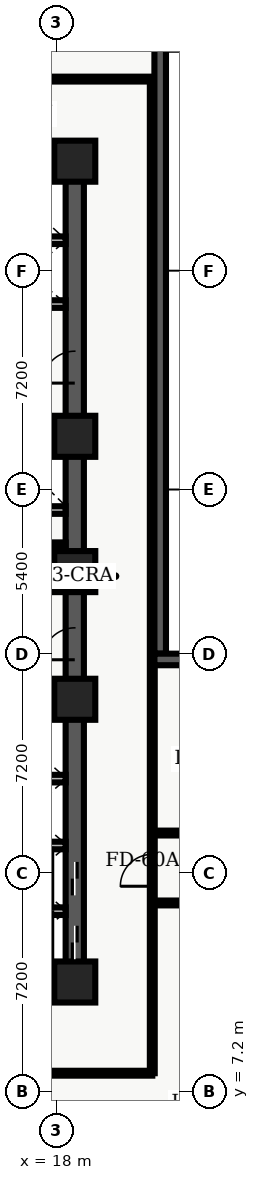
"""IFC4 building model, lengths in metres.
Left out: names, types, materials, properties, quantities, classifications, styles, units other than length and angle.
Written with IfcOpenShell. Run it as: python <this file> out.ifc"""

import sys

from ifc_helpers import new_model, entity, si_unit, converted_unit, direction, frame, origin_with_axes, origin_2d_with_axis, place, context, subcontext, project, spatial, polyline, rectangle, outline, extrude, element, fill, save


model = new_model("IFC4")
c1 = context("Model", 3, precision=1e-05, world=origin_with_axes(), true_north=direction((0.0, 1.0)))
c2 = subcontext(c1, "Body", "Model", "MODEL_VIEW")
j1 = project(units=[si_unit("LENGTHUNIT", "METRE"), converted_unit("PLANEANGLEUNIT", "DEGREE", entity("IfcPlaneAngleMeasure", 0.017), si_unit("PLANEANGLEUNIT", "RADIAN"), dimensions=[0, 0, 0, 0, 0, 0, 0])], contexts=[c1])
p1 = place(None, origin_with_axes())
s1 = spatial("IfcSite", under=j1, at=p1, CompositionType="ELEMENT")
p2 = place(p1, origin_with_axes())
s2 = spatial("IfcBuilding", under=s1, at=p2, CompositionType="ELEMENT")
p3 = place(p2, frame((0.0, 0.0, 56.1), z_axis=(0.0, 0.0, 1.0), x_axis=(1.0, 0.0, 0.0)))
s3 = spatial("IfcBuildingStorey", under=s2, at=p3, CompositionType="ELEMENT", Elevation=56.1)
p4 = place(p3, frame((11.4, 10.8, 0.0), z_axis=(0.0, 0.0, 1.0), x_axis=(1.0, 0.0, 0.0)))
e1 = element("IfcWall", 1, at=p4, inside=s3, PredefinedType="SHEAR", context=c2, shape_type="SweptSolid", body=[
    extrude(outline(polyline([(0.0, -0.3), (7.2, -0.3), (7.2, 0.3), (0.0, 0.3), (0.0, -0.3)])), origin_with_axes(), (0.0, 0.0, 1.0), 3.66),
])
p5 = place(p4, frame((2.625, 0.0, 0.0), z_axis=(0.0, 0.0, 1.0), x_axis=(1.0, 0.0, 0.0)))
e2 = element("IfcOpeningElement", 2, at=p5, cuts=e1, PredefinedType="OPENING", context=c2, shape_type="SweptSolid", body=[
    extrude(rectangle(XDim=1.05, YDim=0.62, at=origin_2d_with_axis()), origin_with_axes(), (0.0, 0.0, 1.0), 2.15),
])
p6 = place(p3, frame((11.4, 37.8, 0.0), z_axis=(0.0, 0.0, 1.0), x_axis=(1.0, 0.0, 0.0)))
e3 = element("IfcWall", 3, at=p6, inside=s3, PredefinedType="SHEAR", context=c2, shape_type="SweptSolid", body=[
    extrude(outline(polyline([(0.0, -0.3), (7.2, -0.3), (7.2, 0.3), (0.0, 0.3), (0.0, -0.3)])), origin_with_axes(), (0.0, 0.0, 1.0), 3.66),
])
p7 = place(p6, frame((2.625, 0.0, 0.0), z_axis=(0.0, 0.0, 1.0), x_axis=(1.0, 0.0, 0.0)))
e4 = element("IfcOpeningElement", 4, at=p7, cuts=e3, PredefinedType="OPENING", context=c2, shape_type="SweptSolid", body=[
    extrude(rectangle(XDim=1.05, YDim=0.62, at=origin_2d_with_axis()), origin_with_axes(), (0.0, 0.0, 1.0), 2.15),
])
p8 = place(p3, frame((18.6, 10.8, 0.0), z_axis=(0.0, 0.0, 1.0), x_axis=(0.0, 1.0, 0.0)))
e5 = element("IfcWall", 5, at=p8, inside=s3, PredefinedType="SHEAR", context=c2, shape_type="SweptSolid", body=[
    extrude(outline(polyline([(0.0, -0.3), (13.5, -0.3), (13.5, 0.3), (0.0, 0.3), (0.0, -0.3)])), origin_with_axes(), (0.0, 0.0, 1.0), 3.66),
])
p9 = place(p8, frame((1.3, 0.0, 0.0), z_axis=(0.0, 0.0, 1.0), x_axis=(1.0, 0.0, 0.0)))
e6 = element("IfcOpeningElement", 6, at=p9, cuts=e5, PredefinedType="OPENING", context=c2, shape_type="SweptSolid", body=[
    extrude(rectangle(XDim=1.1, YDim=0.62, at=origin_2d_with_axis()), origin_with_axes(), (0.0, 0.0, 1.0), 2.15),
])
p10 = place(p8, frame((3.4, 0.0, 0.0), z_axis=(0.0, 0.0, 1.0), x_axis=(1.0, 0.0, 0.0)))
e7 = element("IfcOpeningElement", 7, at=p10, cuts=e5, PredefinedType="OPENING", context=c2, shape_type="SweptSolid", body=[
    extrude(rectangle(XDim=1.1, YDim=0.62, at=origin_2d_with_axis()), origin_with_axes(), (0.0, 0.0, 1.0), 2.15),
])
p11 = place(p8, frame((11.125, 0.0, 0.0), z_axis=(0.0, 0.0, 1.0), x_axis=(1.0, 0.0, 0.0)))
e8 = element("IfcOpeningElement", 8, at=p11, cuts=e5, PredefinedType="OPENING", context=c2, shape_type="SweptSolid", body=[
    extrude(rectangle(XDim=1.05, YDim=0.62, at=origin_2d_with_axis()), origin_with_axes(), (0.0, 0.0, 1.0), 2.15),
])
p12 = place(p3, frame((18.6, 24.3, 0.0), z_axis=(0.0, 0.0, 1.0), x_axis=(0.0, 1.0, 0.0)))
e9 = element("IfcWall", 9, at=p12, inside=s3, PredefinedType="SHEAR", context=c2, shape_type="SweptSolid", body=[
    extrude(outline(polyline([(0.0, -0.3), (13.5, -0.3), (13.5, 0.3), (0.0, 0.3), (0.0, -0.3)])), origin_with_axes(), (0.0, 0.0, 1.0), 3.66),
])
p13 = place(p12, frame((6.725, 0.0, 0.0), z_axis=(0.0, 0.0, 1.0), x_axis=(1.0, 0.0, 0.0)))
e10 = element("IfcOpeningElement", 10, at=p13, cuts=e9, PredefinedType="OPENING", context=c2, shape_type="SweptSolid", body=[
    extrude(rectangle(XDim=1.05, YDim=0.62, at=origin_2d_with_axis()), origin_with_axes(), (0.0, 0.0, 1.0), 2.15),
])
for number, where, z_axis, x_axis in (
    (11, (11.7, 19.825, 0.0), (0.0, 0.0, 1.0), (1.0, 0.0, 0.0)),
    (12, (11.7, 28.775, 0.0), (0.0, 0.0, 1.0), (1.0, 0.0, 0.0)),
):
    element("IfcWall", number, at=place(p3, frame(where, z_axis=z_axis, x_axis=x_axis)), inside=s3, PredefinedType="SHEAR", context=c2, shape_type="SweptSolid", body=[
        extrude(outline(polyline([(0.0, -0.125), (6.6, -0.125), (6.6, 0.125), (0.0, 0.125), (0.0, -0.125)])), origin_with_axes(), (0.0, 0.0, 1.0), 3.66),
    ])
p14 = place(p3, frame((11.7, 24.1, 0.0), z_axis=(0.0, 0.0, 1.0), x_axis=(1.0, 0.0, 0.0)))
e13 = element("IfcWall", 13, at=p14, inside=s3, PredefinedType="SOLIDWALL", context=c2, shape_type="SweptSolid", body=[
    extrude(outline(polyline([(0.0, -0.125), (6.6, -0.125), (6.6, 0.125), (0.0, 0.125), (0.0, -0.125)])), origin_with_axes(), (0.0, 0.0, 1.0), 2.7),
])
p15 = place(p14, frame((3.75, 0.0, 0.0), z_axis=(0.0, 0.0, 1.0), x_axis=(1.0, 0.0, 0.0)))
e14 = element("IfcOpeningElement", 14, at=p15, cuts=e13, PredefinedType="OPENING", context=c2, shape_type="SweptSolid", body=[
    extrude(rectangle(XDim=0.9, YDim=0.27, at=origin_2d_with_axis()), origin_with_axes(), (0.0, 0.0, 1.0), 2.15),
])
p16 = place(p3, frame((11.7, 26.325, 0.0), z_axis=(0.0, 0.0, 1.0), x_axis=(1.0, 0.0, 0.0)))
e15 = element("IfcWall", 15, at=p16, inside=s3, PredefinedType="SOLIDWALL", context=c2, shape_type="SweptSolid", body=[
    extrude(outline(polyline([(0.0, -0.125), (6.6, -0.125), (6.6, 0.125), (0.0, 0.125), (0.0, -0.125)])), origin_with_axes(), (0.0, 0.0, 1.0), 2.7),
])
p17 = place(p16, frame((3.5, 0.0, 0.0), z_axis=(0.0, 0.0, 1.0), x_axis=(1.0, 0.0, 0.0)))
e16 = element("IfcOpeningElement", 16, at=p17, cuts=e15, PredefinedType="OPENING", context=c2, shape_type="SweptSolid", body=[
    extrude(rectangle(XDim=0.9, YDim=0.27, at=origin_2d_with_axis()), origin_with_axes(), (0.0, 0.0, 1.0), 2.15),
])
for number, where, z_axis, x_axis in (
    (17, (18.6, 10.8, 0.0), (0.0, 0.0, 1.0), (1.0, 0.0, 0.0)),
    (18, (18.6, 20.1, 0.0), (0.0, 0.0, 1.0), (1.0, 0.0, 0.0)),
    (19, (18.6, 24.3, 0.0), (0.0, 0.0, 1.0), (1.0, 0.0, 0.0)),
    (20, (18.6, 28.75, 0.0), (0.0, 0.0, 1.0), (1.0, 0.0, 0.0)),
    (21, (18.6, 37.8, 0.0), (0.0, 0.0, 1.0), (1.0, 0.0, 0.0)),
):
    element("IfcColumn", number, at=place(p3, frame(where, z_axis=z_axis, x_axis=x_axis)), inside=s3, PredefinedType="COLUMN", context=c2, shape_type="SweptSolid", body=[
        extrude(rectangle(XDim=1.35, YDim=1.35, at=origin_2d_with_axis()), origin_with_axes(), (0.0, 0.0, 1.0), 3.9),
    ])
p18 = place(p3, frame((14.62, 25.18, 0.0), z_axis=(0.0, 0.0, 1.0), x_axis=(1.0, 0.0, 0.0)))
e22 = element("IfcWall", 22, at=p18, inside=s3, PredefinedType="PARTITIONING", context=c2, shape_type="SweptSolid", body=[
    extrude(outline(polyline([(0.0, -0.08), (3.68, -0.08), (3.68, 0.08), (0.0, 0.08), (0.0, -0.08)])), origin_with_axes(), (0.0, 0.0, 1.0), 2.7),
])
p19 = place(p18, frame((1.95, 0.0, 0.0), z_axis=(0.0, 0.0, 1.0), x_axis=(1.0, 0.0, 0.0)))
e23 = element("IfcOpeningElement", 23, at=p19, cuts=e22, PredefinedType="OPENING", context=c2, shape_type="SweptSolid", body=[
    extrude(rectangle(XDim=0.9, YDim=0.18, at=origin_2d_with_axis()), origin_with_axes(), (0.0, 0.0, 1.0), 2.15),
])
for number, where, z_axis, x_axis in (
    (24, (15.84, 13.13, 0.0), (0.0, 0.0, 1.0), (1.0, 0.0, 0.0)),
    (25, (15.84, 15.29, 0.0), (0.0, 0.0, 1.0), (1.0, 0.0, 0.0)),
    (26, (15.84, 17.49, 0.0), (0.0, 0.0, 1.0), (1.0, 0.0, 0.0)),
    (27, (15.84, 33.1, 0.0), (0.0, 0.0, 1.0), (1.0, 0.0, 0.0)),
    (28, (15.84, 35.2, 0.0), (0.0, 0.0, 1.0), (1.0, 0.0, 0.0)),
):
    element("IfcWall", number, at=place(p3, frame(where, z_axis=z_axis, x_axis=x_axis)), inside=s3, PredefinedType="SOLIDWALL", context=c2, shape_type="SweptSolid", body=[
        extrude(outline(polyline([(0.0, -0.125), (2.46, -0.125), (2.46, 0.125), (0.0, 0.125), (0.0, -0.125)])), origin_with_axes(), (0.0, 0.0, 1.0), 2.7),
    ])
p20 = place(p3, frame((2.6, 7.8, 0.0), z_axis=(0.0, 0.0, 1.0), x_axis=(1.0, 0.0, 0.0)))
e29 = element("IfcWall", 29, at=p20, inside=s3, PredefinedType="PARTITIONING", context=c2, shape_type="SweptSolid", body=[
    extrude(outline(polyline([(0.0, -0.08), (18.55, -0.08), (18.55, 0.08), (0.0, 0.08), (0.0, -0.08)])), origin_with_axes(), (0.0, 0.0, 1.0), 2.7),
])
p21 = place(p20, frame((2.91, 0.0, 0.0), z_axis=(0.0, 0.0, 1.0), x_axis=(1.0, 0.0, 0.0)))
e30 = element("IfcOpeningElement", 30, at=p21, cuts=e29, PredefinedType="OPENING", context=c2, shape_type="SweptSolid", body=[
    extrude(rectangle(XDim=1.2, YDim=0.18, at=origin_2d_with_axis()), origin_with_axes(), (0.0, 0.0, 1.0), 2.2),
])
p22 = place(p20, frame((13.415, 0.0, 0.0), z_axis=(0.0, 0.0, 1.0), x_axis=(1.0, 0.0, 0.0)))
e31 = element("IfcOpeningElement", 31, at=p22, cuts=e29, PredefinedType="OPENING", context=c2, shape_type="SweptSolid", body=[
    extrude(rectangle(XDim=1.0, YDim=0.18, at=origin_2d_with_axis()), origin_with_axes(), (0.0, 0.0, 1.0), 2.15),
])
p23 = place(p3, frame((2.6, 40.5, 0.0), z_axis=(0.0, 0.0, 1.0), x_axis=(1.0, 0.0, 0.0)))
e32 = element("IfcWall", 32, at=p23, inside=s3, PredefinedType="PARTITIONING", context=c2, shape_type="SweptSolid", body=[
    extrude(outline(polyline([(0.0, -0.08), (18.65, -0.08), (18.65, 0.08), (0.0, 0.08), (0.0, -0.08)])), origin_with_axes(), (0.0, 0.0, 1.0), 2.7),
])
p24 = place(p23, frame((2.915, 0.0, 0.0), z_axis=(0.0, 0.0, 1.0), x_axis=(1.0, 0.0, 0.0)))
e33 = element("IfcOpeningElement", 33, at=p24, cuts=e32, PredefinedType="OPENING", context=c2, shape_type="SweptSolid", body=[
    extrude(rectangle(XDim=1.0, YDim=0.18, at=origin_2d_with_axis()), origin_with_axes(), (0.0, 0.0, 1.0), 2.15),
])
p25 = place(p23, frame((9.254, 0.0, 0.0), z_axis=(0.0, 0.0, 1.0), x_axis=(1.0, 0.0, 0.0)))
e34 = element("IfcOpeningElement", 34, at=p25, cuts=e32, PredefinedType="OPENING", context=c2, shape_type="SweptSolid", body=[
    extrude(rectangle(XDim=1.2, YDim=0.18, at=origin_2d_with_axis()), origin_with_axes(), (0.0, 0.0, 1.0), 2.2),
])
p26 = place(p23, frame((14.543, 0.0, 0.0), z_axis=(0.0, 0.0, 1.0), x_axis=(1.0, 0.0, 0.0)))
e35 = element("IfcOpeningElement", 35, at=p26, cuts=e32, PredefinedType="OPENING", context=c2, shape_type="SweptSolid", body=[
    extrude(rectangle(XDim=1.0, YDim=0.18, at=origin_2d_with_axis()), origin_with_axes(), (0.0, 0.0, 1.0), 2.15),
])
p27 = place(p3, frame((21.15, 7.8, 0.0), z_axis=(0.0, 0.0, 1.0), x_axis=(0.0, 1.0, 0.0)))
e36 = element("IfcWall", 36, at=p27, inside=s3, PredefinedType="PARTITIONING", context=c2, shape_type="SweptSolid", body=[
    extrude(outline(polyline([(0.0, -0.08), (32.7, -0.08), (32.7, 0.08), (0.0, 0.08), (0.0, -0.08)])), origin_with_axes(), (0.0, 0.0, 1.0), 2.7),
])
p28 = place(p27, frame((6.675, 0.0, 0.0), z_axis=(0.0, 0.0, 1.0), x_axis=(1.0, 0.0, 0.0)))
e37 = element("IfcOpeningElement", 37, at=p28, cuts=e36, PredefinedType="OPENING", context=c2, shape_type="SweptSolid", body=[
    extrude(rectangle(XDim=1.05, YDim=0.18, at=origin_2d_with_axis()), origin_with_axes(), (0.0, 0.0, 1.0), 2.15),
])
p29 = place(p3, frame((21.15, 13.4, 0.0), z_axis=(0.0, 0.0, 1.0), x_axis=(1.0, 0.0, 0.0)))
e38 = element("IfcWall", 38, at=p29, inside=s3, PredefinedType="PARTITIONING", context=c2, shape_type="SweptSolid", body=[
    extrude(outline(polyline([(0.0, -0.08), (15.2, -0.08), (15.2, 0.08), (0.0, 0.08), (0.0, -0.08)])), origin_with_axes(), (0.0, 0.0, 1.0), 2.7),
])
p30 = place(p29, frame((2.284, 0.0, 0.0), z_axis=(0.0, 0.0, 1.0), x_axis=(1.0, 0.0, 0.0)))
e39 = element("IfcOpeningElement", 39, at=p30, cuts=e38, PredefinedType="OPENING", context=c2, shape_type="SweptSolid", body=[
    extrude(rectangle(XDim=1.0, YDim=0.18, at=origin_2d_with_axis()), origin_with_axes(), (0.0, 0.0, 1.0), 2.15),
])
p31 = place(p29, frame((6.853, 0.0, 0.0), z_axis=(0.0, 0.0, 1.0), x_axis=(1.0, 0.0, 0.0)))
e40 = element("IfcOpeningElement", 40, at=p31, cuts=e38, PredefinedType="OPENING", context=c2, shape_type="SweptSolid", body=[
    extrude(rectangle(XDim=1.2, YDim=0.18, at=origin_2d_with_axis()), origin_with_axes(), (0.0, 0.0, 1.0), 2.2),
])
p32 = place(p29, frame((12.219, 0.0, 0.0), z_axis=(0.0, 0.0, 1.0), x_axis=(1.0, 0.0, 0.0)))
e41 = element("IfcOpeningElement", 41, at=p32, cuts=e38, PredefinedType="OPENING", context=c2, shape_type="SweptSolid", body=[
    extrude(rectangle(XDim=1.0, YDim=0.18, at=origin_2d_with_axis()), origin_with_axes(), (0.0, 0.0, 1.0), 2.15),
])
p33 = place(p3, frame((21.15, 15.7, 0.0), z_axis=(0.0, 0.0, 1.0), x_axis=(1.0, 0.0, 0.0)))
e42 = element("IfcWall", 42, at=p33, inside=s3, PredefinedType="PARTITIONING", context=c2, shape_type="SweptSolid", body=[
    extrude(outline(polyline([(0.0, -0.08), (15.2, -0.08), (15.2, 0.08), (0.0, 0.08), (0.0, -0.08)])), origin_with_axes(), (0.0, 0.0, 1.0), 2.7),
])
p34 = place(p33, frame((3.583, 0.0, 0.0), z_axis=(0.0, 0.0, 1.0), x_axis=(1.0, 0.0, 0.0)))
e43 = element("IfcOpeningElement", 43, at=p34, cuts=e42, PredefinedType="OPENING", context=c2, shape_type="SweptSolid", body=[
    extrude(rectangle(XDim=1.0, YDim=0.18, at=origin_2d_with_axis()), origin_with_axes(), (0.0, 0.0, 1.0), 2.15),
])
p35 = place(p33, frame((11.053, 0.0, 0.0), z_axis=(0.0, 0.0, 1.0), x_axis=(1.0, 0.0, 0.0)))
e44 = element("IfcOpeningElement", 44, at=p35, cuts=e42, PredefinedType="OPENING", context=c2, shape_type="SweptSolid", body=[
    extrude(rectangle(XDim=1.0, YDim=0.18, at=origin_2d_with_axis()), origin_with_axes(), (0.0, 0.0, 1.0), 2.15),
])
p36 = place(p3, frame((21.41, 45.82, 0.0), z_axis=(0.0, 0.0, 1.0), x_axis=(0.0, -1.0, 0.0)))
e45 = element("IfcWall", 45, at=p36, inside=s3, PredefinedType="SOLIDWALL", context=c2, shape_type="SweptSolid", body=[
    extrude(outline(polyline([(0.0, -0.19), (24.22, -0.19), (24.22, 0.19), (0.0, 0.19), (0.0, -0.19)])), origin_with_axes(), (0.0, 0.0, 1.0), 3.66),
])
p37 = place(p36, frame((2.902, 0.0, 0.45), z_axis=(0.0, 0.0, 1.0), x_axis=(1.0, 0.0, 0.0)))
e46 = element("IfcOpeningElement", 46, at=p37, cuts=e45, PredefinedType="OPENING", context=c2, shape_type="SweptSolid", body=[
    extrude(rectangle(XDim=2.1, YDim=0.4, at=origin_2d_with_axis()), origin_with_axes(), (0.0, 0.0, 1.0), 2.2),
])
p38 = place(p3, frame((21.22, 21.41, 0.0), z_axis=(0.0, 0.0, 1.0), x_axis=(1.0, 0.0, 0.0)))
e47 = element("IfcWall", 47, at=p38, inside=s3, PredefinedType="SOLIDWALL", context=c2, shape_type="SweptSolid", body=[
    extrude(outline(polyline([(0.0, -0.19), (17.18, -0.19), (17.18, 0.19), (0.0, 0.19), (0.0, -0.19)])), origin_with_axes(), (0.0, 0.0, 1.0), 3.66),
])
p39 = place(p38, frame((3.263, 0.0, 0.45), z_axis=(0.0, 0.0, 1.0), x_axis=(1.0, 0.0, 0.0)))
e48 = element("IfcOpeningElement", 48, at=p39, cuts=e47, PredefinedType="OPENING", context=c2, shape_type="SweptSolid", body=[
    extrude(rectangle(XDim=2.1, YDim=0.4, at=origin_2d_with_axis()), origin_with_axes(), (0.0, 0.0, 1.0), 2.2),
])
p40 = place(p38, frame((8.59, 0.0, 0.45), z_axis=(0.0, 0.0, 1.0), x_axis=(1.0, 0.0, 0.0)))
e49 = element("IfcOpeningElement", 49, at=p40, cuts=e47, PredefinedType="OPENING", context=c2, shape_type="SweptSolid", body=[
    extrude(rectangle(XDim=2.1, YDim=0.4, at=origin_2d_with_axis()), origin_with_axes(), (0.0, 0.0, 1.0), 2.2),
])
p41 = place(p38, frame((13.467, 0.0, 0.45), z_axis=(0.0, 0.0, 1.0), x_axis=(1.0, 0.0, 0.0)))
e50 = element("IfcOpeningElement", 50, at=p41, cuts=e47, PredefinedType="OPENING", context=c2, shape_type="SweptSolid", body=[
    extrude(rectangle(XDim=2.1, YDim=0.4, at=origin_2d_with_axis()), origin_with_axes(), (0.0, 0.0, 1.0), 2.2),
])
p42 = place(p8, frame((1.3, 0.0, 0.0), z_axis=(0.0, 0.0, 1.0), x_axis=(1.0, 0.0, 0.0)))
e51 = element("IfcDoor", 51, at=p42, inside=s3, OperationType="SLIDING_TO_LEFT", PredefinedType="DOOR", context=c2, shape_type="SweptSolid", body=[
    extrude(rectangle(XDim=1.1, YDim=0.09, at=origin_2d_with_axis()), origin_with_axes(), (0.0, 0.0, 1.0), 2.15),
])
fill(e6, e51)
p43 = place(p8, frame((3.4, 0.0, 0.0), z_axis=(0.0, 0.0, 1.0), x_axis=(1.0, 0.0, 0.0)))
e52 = element("IfcDoor", 52, at=p43, inside=s3, OperationType="SLIDING_TO_RIGHT", PredefinedType="DOOR", context=c2, shape_type="SweptSolid", body=[
    extrude(rectangle(XDim=1.1, YDim=0.09, at=origin_2d_with_axis()), origin_with_axes(), (0.0, 0.0, 1.0), 2.15),
])
fill(e7, e52)
p44 = place(p8, frame((11.125, 0.0, 0.0), z_axis=(0.0, 0.0, 1.0), x_axis=(1.0, 0.0, 0.0)))
e53 = element("IfcDoor", 53, at=p44, inside=s3, OperationType="SINGLE_SWING_LEFT", PredefinedType="DOOR", context=c2, shape_type="SweptSolid", body=[
    extrude(rectangle(XDim=1.05, YDim=0.09, at=origin_2d_with_axis()), origin_with_axes(), (0.0, 0.0, 1.0), 2.15),
])
fill(e8, e53)
p45 = place(p12, frame((6.725, 0.0, 0.0), z_axis=(0.0, 0.0, 1.0), x_axis=(1.0, 0.0, 0.0)))
e54 = element("IfcDoor", 54, at=p45, inside=s3, OperationType="SINGLE_SWING_LEFT", PredefinedType="DOOR", context=c2, shape_type="SweptSolid", body=[
    extrude(rectangle(XDim=1.05, YDim=0.09, at=origin_2d_with_axis()), origin_with_axes(), (0.0, 0.0, 1.0), 2.15),
])
fill(e10, e54)
p46 = place(p27, frame((6.675, 0.0, 0.0), z_axis=(0.0, 0.0, 1.0), x_axis=(1.0, 0.0, 0.0)))
e55 = element("IfcDoor", 55, at=p46, inside=s3, OperationType="SINGLE_SWING_LEFT", PredefinedType="DOOR", context=c2, shape_type="SweptSolid", body=[
    extrude(rectangle(XDim=1.05, YDim=0.09, at=origin_2d_with_axis()), origin_with_axes(), (0.0, 0.0, 1.0), 2.15),
])
fill(e37, e55)
save(model, sys.argv[1])
